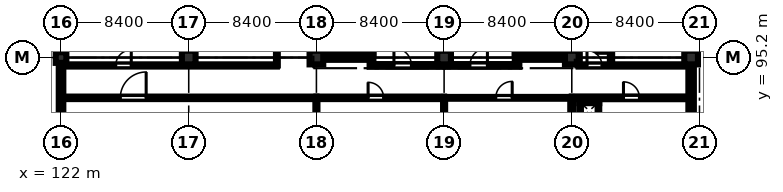
"""IFC4 building model, lengths in metres.
Left out: names, types, materials, properties, quantities, classifications, styles, units other than length and angle.
Written with IfcOpenShell. Run it as: python <this file> out.ifc"""

import sys

from ifc_helpers import new_model, si_unit, direction, frame, frame_2d, origin, origin_2d, place, context, subcontext, project, spatial, rectangle, extrude, element, fill, save


model = new_model("IFC4")
c1 = context("Model", 3, precision=1e-05, world=origin(), true_north=direction((0.0, 1.0)))
c2 = subcontext(c1, "Body", "Model", "MODEL_VIEW")
j1 = project(units=[si_unit("LENGTHUNIT", "METRE"), si_unit("PLANEANGLEUNIT", "RADIAN")], contexts=[c1])
p1 = place(None, origin())
s1 = spatial("IfcSite", under=j1, at=p1, CompositionType="ELEMENT")
p2 = place(p1, origin())
s2 = spatial("IfcBuilding", under=s1, at=p2, CompositionType="ELEMENT")
p3 = place(p2, frame((0.0, 0.0, 19.2)))
s3 = spatial("IfcBuildingStorey", under=s2, at=p3, CompositionType="ELEMENT", Elevation=19.2)
p4 = place(p3, frame((122.0, 95.2, 0.0), z_axis=(0.0, 0.0, 1.0), x_axis=(1.0, 0.0, 0.0)))
e1 = element("IfcColumn", 1, at=p4, inside=s3, PredefinedType="COLUMN", context=c2, shape_type="SweptSolid", body=[
    extrude(rectangle(XDim=0.7, YDim=0.7, at=origin_2d()), origin(), (0.0, 0.0, 1.0), 4.02),
])
for number, where, z_axis, x_axis in (
    (2, (130.4, 95.2, 0.0), (0.0, 0.0, 1.0), (1.0, 0.0, 0.0)),
    (3, (138.8, 95.2, 0.0), (0.0, 0.0, 1.0), (1.0, 0.0, 0.0)),
    (4, (147.2, 95.2, 0.0), (0.0, 0.0, 1.0), (1.0, 0.0, 0.0)),
    (5, (155.6, 95.2, 0.0), (0.0, 0.0, 1.0), (1.0, 0.0, 0.0)),
    (6, (163.45, 95.2, 0.0), (0.0, 0.0, 1.0), (1.0, 0.0, 0.0)),
):
    element("IfcColumn", number, at=place(p3, frame(where, z_axis=z_axis, x_axis=x_axis)), inside=s3, PredefinedType="COLUMN", context=c2, shape_type="SweptSolid", body=[
        extrude(rectangle(XDim=0.9, YDim=0.9, at=origin_2d()), origin(), (0.0, 0.0, 1.0), 4.02),
    ])
p5 = place(p3, frame((138.65, 95.25, 0.0), z_axis=(0.0, 0.0, 1.0), x_axis=(1.0, 0.0, 0.0)))
e7 = element("IfcWall", 7, at=p5, inside=s3, PredefinedType="SHEAR", context=c2, shape_type="SweptSolid", body=[
    extrude(rectangle(XDim=3.9, YDim=0.4, at=frame_2d((1.95, 0.0))), origin(), (0.0, 0.0, 1.0), 4.02),
])
p6 = place(p3, frame((138.85, 95.45, 0.0), z_axis=(0.0, 0.0, 1.0), x_axis=(0.0, 1.0, 0.0)))
e8 = element("IfcWall", 8, at=p6, inside=s3, PredefinedType="SHEAR", context=c2, shape_type="SweptSolid", body=[
    extrude(rectangle(XDim=7.9, YDim=0.4, at=frame_2d((3.95, 0.0))), origin(), (0.0, 0.0, 1.0), 4.02),
])
p7 = place(p3, frame((142.35, 95.45, 0.0), z_axis=(0.0, 0.0, 1.0), x_axis=(0.0, 1.0, 0.0)))
e9 = element("IfcWall", 9, at=p7, inside=s3, PredefinedType="SHEAR", context=c2, shape_type="SweptSolid", body=[
    extrude(rectangle(XDim=7.9, YDim=0.4, at=frame_2d((3.95, 0.0))), origin(), (0.0, 0.0, 1.0), 4.02),
])
p8 = place(p7, frame((0.22, 0.0, 0.0)))
e10 = element("IfcOpeningElement", 10, at=p8, cuts=e9, PredefinedType="OPENING", context=c2, shape_type="SweptSolid", body=[
    extrude(rectangle(XDim=1.15, YDim=2.15, at=frame_2d((0.575, 1.075))), frame((0.0, 0.21, 0.0), z_axis=(0.0, -1.0, 0.0), x_axis=(1.0, 0.0, 0.0)), (0.0, 0.0, 1.0), 0.42),
])
p9 = place(p3, frame((151.85, 95.25, 0.0), z_axis=(0.0, 0.0, 1.0), x_axis=(1.0, 0.0, 0.0)))
e11 = element("IfcWall", 11, at=p9, inside=s3, PredefinedType="SHEAR", context=c2, shape_type="SweptSolid", body=[
    extrude(rectangle(XDim=3.9, YDim=0.4, at=frame_2d((1.95, 0.0))), origin(), (0.0, 0.0, 1.0), 4.02),
])
p10 = place(p3, frame((152.05, 95.45, 0.0), z_axis=(0.0, 0.0, 1.0), x_axis=(0.0, 1.0, 0.0)))
e12 = element("IfcWall", 12, at=p10, inside=s3, PredefinedType="SHEAR", context=c2, shape_type="SweptSolid", body=[
    extrude(rectangle(XDim=7.9, YDim=0.4, at=frame_2d((3.95, 0.0))), origin(), (0.0, 0.0, 1.0), 4.02),
])
p11 = place(p10, frame((0.35, 0.0, 0.0)))
e13 = element("IfcOpeningElement", 13, at=p11, cuts=e12, PredefinedType="OPENING", context=c2, shape_type="SweptSolid", body=[
    extrude(rectangle(XDim=1.15, YDim=2.15, at=frame_2d((0.575, 1.075))), frame((0.0, 0.21, 0.0), z_axis=(0.0, -1.0, 0.0), x_axis=(1.0, 0.0, 0.0)), (0.0, 0.0, 1.0), 0.42),
])
p12 = place(p3, frame((155.55, 95.45, 0.0), z_axis=(0.0, 0.0, 1.0), x_axis=(0.0, 1.0, 0.0)))
e14 = element("IfcWall", 14, at=p12, inside=s3, PredefinedType="SHEAR", context=c2, shape_type="SweptSolid", body=[
    extrude(rectangle(XDim=7.9, YDim=0.4, at=frame_2d((3.95, 0.0))), origin(), (0.0, 0.0, 1.0), 4.02),
])
p13 = place(p3, frame((163.45, 94.75, 0.0), z_axis=(0.0, 0.0, 1.0), x_axis=(0.0, -1.0, 0.0)))
e15 = element("IfcWall", 15, at=p13, inside=s3, PredefinedType="STANDARD", context=c2, shape_type="SweptSolid", body=[
    extrude(rectangle(XDim=7.5, YDim=0.36, at=frame_2d((3.75, 0.0))), origin(), (0.0, 0.0, 1.0), 3.32),
])
p14 = place(p13, frame((4.2, 0.0, 1.1)))
e16 = element("IfcOpeningElement", 16, at=p14, cuts=e15, PredefinedType="OPENING", context=c2, shape_type="SweptSolid", body=[
    extrude(rectangle(XDim=1.8, YDim=1.8, at=frame_2d((0.9, 0.9))), frame((0.0, 0.19, 0.0), z_axis=(0.0, -1.0, 0.0), x_axis=(1.0, 0.0, 0.0)), (0.0, 0.0, 1.0), 0.38),
])
p15 = place(p3, frame((122.0, 87.15, 0.0), z_axis=(0.0, 0.0, 1.0), x_axis=(0.0, 1.0, 0.0)))
e17 = element("IfcWall", 17, at=p15, inside=s3, PredefinedType="STANDARD", context=c2, shape_type="SweptSolid", body=[
    extrude(rectangle(XDim=7.7, YDim=0.3, at=frame_2d((3.85, 0.0))), origin(), (0.0, 0.0, 1.0), 3.32),
])
p16 = place(p15, frame((2.4, 0.0, 0.95)))
e18 = element("IfcOpeningElement", 18, at=p16, cuts=e17, PredefinedType="OPENING", context=c2, shape_type="SweptSolid", body=[
    extrude(rectangle(XDim=1.5, YDim=1.8, at=frame_2d((0.75, 0.9))), frame((0.0, 0.16, 0.0), z_axis=(0.0, -1.0, 0.0), x_axis=(1.0, 0.0, 0.0)), (0.0, 0.0, 1.0), 0.32),
])
p17 = place(p3, frame((122.0, 95.55, 0.0), z_axis=(0.0, 0.0, 1.0), x_axis=(0.0, 1.0, 0.0)))
e19 = element("IfcWall", 19, at=p17, inside=s3, PredefinedType="STANDARD", context=c2, shape_type="SweptSolid", body=[
    extrude(rectangle(XDim=7.7, YDim=0.3, at=frame_2d((3.85, 0.0))), origin(), (0.0, 0.0, 1.0), 3.32),
])
p18 = place(p17, frame((2.4, 0.0, 1.0)))
e20 = element("IfcOpeningElement", 20, at=p18, cuts=e19, PredefinedType="OPENING", context=c2, shape_type="SweptSolid", body=[
    extrude(rectangle(XDim=1.8, YDim=1.8, at=frame_2d((0.9, 0.9))), frame((0.0, 0.16, 0.0), z_axis=(0.0, -1.0, 0.0), x_axis=(1.0, 0.0, 0.0)), (0.0, 0.0, 1.0), 0.32),
])
p19 = place(p3, frame((142.3, 94.68, 0.0), z_axis=(0.0, 0.0, 1.0), x_axis=(1.0, 0.0, 0.0)))
e21 = element("IfcWall", 21, at=p19, inside=s3, PredefinedType="STANDARD", context=c2, shape_type="SweptSolid", body=[
    extrude(rectangle(XDim=4.8, YDim=0.18, at=frame_2d((2.4, 0.0))), origin(), (0.0, 0.0, 1.0), 4.02),
])
p20 = place(p19, frame((1.6, 0.0, 0.0)))
e22 = element("IfcOpeningElement", 22, at=p20, cuts=e21, PredefinedType="OPENING", context=c2, shape_type="SweptSolid", body=[
    extrude(rectangle(XDim=1.15, YDim=2.15, at=frame_2d((0.575, 1.075))), frame((0.0, 0.1, 0.0), z_axis=(0.0, -1.0, 0.0), x_axis=(1.0, 0.0, 0.0)), (0.0, 0.0, 1.0), 0.2),
])
p21 = place(p3, frame((147.3, 94.68, 0.0), z_axis=(0.0, 0.0, 1.0), x_axis=(1.0, 0.0, 0.0)))
e23 = element("IfcWall", 23, at=p21, inside=s3, PredefinedType="STANDARD", context=c2, shape_type="SweptSolid", body=[
    extrude(rectangle(XDim=4.85, YDim=0.18, at=frame_2d((2.425, 0.0))), origin(), (0.0, 0.0, 1.0), 4.02),
])
p22 = place(p21, frame((1.6, 0.0, 0.0)))
e24 = element("IfcOpeningElement", 24, at=p22, cuts=e23, PredefinedType="OPENING", context=c2, shape_type="SweptSolid", body=[
    extrude(rectangle(XDim=1.15, YDim=2.15, at=frame_2d((0.575, 1.075))), frame((0.0, 0.1, 0.0), z_axis=(0.0, -1.0, 0.0), x_axis=(1.0, 0.0, 0.0)), (0.0, 0.0, 1.0), 0.2),
])
p23 = place(p3, frame((156.05, 94.68, 0.0), z_axis=(0.0, 0.0, 1.0), x_axis=(1.0, 0.0, 0.0)))
e25 = element("IfcWall", 25, at=p23, inside=s3, PredefinedType="PARTITIONING", context=c2, shape_type="SweptSolid", body=[
    extrude(rectangle(XDim=7.15, YDim=0.15, at=frame_2d((3.575, 0.0))), origin(), (0.0, 0.0, 1.0), 4.02),
])
p24 = place(p23, frame((0.55, 0.0, 0.0)))
e26 = element("IfcOpeningElement", 26, at=p24, cuts=e25, PredefinedType="OPENING", context=c2, shape_type="SweptSolid", body=[
    extrude(rectangle(XDim=0.98, YDim=2.12, at=frame_2d((0.49, 1.06))), frame((0.0, 0.085, 0.0), z_axis=(0.0, -1.0, 0.0), x_axis=(1.0, 0.0, 0.0)), (0.0, 0.0, 1.0), 0.17),
])
p25 = place(p3, frame((158.18, 94.68, 0.0), z_axis=(0.0, 0.0, 1.0), x_axis=(0.0, 1.0, 0.0)))
e27 = element("IfcWall", 27, at=p25, inside=s3, PredefinedType="PARTITIONING", context=c2, shape_type="SweptSolid", body=[
    extrude(rectangle(XDim=8.57, YDim=0.15, at=frame_2d((4.285, 0.0))), origin(), (0.0, 0.0, 1.0), 4.02),
])
p26 = place(p25, frame((0.8, 0.0, 0.0)))
e28 = element("IfcOpeningElement", 28, at=p26, cuts=e27, PredefinedType="OPENING", context=c2, shape_type="SweptSolid", body=[
    extrude(rectangle(XDim=1.0, YDim=2.12, at=frame_2d((0.5, 1.06))), frame((0.0, 0.085, 0.0), z_axis=(0.0, -1.0, 0.0), x_axis=(1.0, 0.0, 0.0)), (0.0, 0.0, 1.0), 0.17),
])
p27 = place(p25, frame((3.5, 0.0, 0.0)))
e29 = element("IfcOpeningElement", 29, at=p27, cuts=e27, PredefinedType="OPENING", context=c2, shape_type="SweptSolid", body=[
    extrude(rectangle(XDim=0.92, YDim=2.1, at=frame_2d((0.46, 1.05))), frame((0.0, 0.085, 0.0), z_axis=(0.0, -1.0, 0.0), x_axis=(1.0, 0.0, 0.0)), (0.0, 0.0, 1.0), 0.17),
])
p28 = place(p25, frame((6.4, 0.0, 0.0)))
e30 = element("IfcOpeningElement", 30, at=p28, cuts=e27, PredefinedType="OPENING", context=c2, shape_type="SweptSolid", body=[
    extrude(rectangle(XDim=0.92, YDim=2.1, at=frame_2d((0.46, 1.05))), frame((0.0, 0.085, 0.0), z_axis=(0.0, -1.0, 0.0), x_axis=(1.0, 0.0, 0.0)), (0.0, 0.0, 1.0), 0.17),
])
p29 = place(p3, frame((156.05, 94.68, 0.0), z_axis=(0.0, 0.0, 1.0), x_axis=(0.0, 1.0, 0.0)))
e31 = element("IfcWall", 31, at=p29, inside=s3, PredefinedType="PARTITIONING", context=c2, shape_type="SweptSolid", body=[
    extrude(rectangle(XDim=8.57, YDim=0.15, at=frame_2d((4.285, 0.0))), origin(), (0.0, 0.0, 1.0), 4.02),
])
p30 = place(p3, frame((136.2, 94.68, 0.0), z_axis=(0.0, 0.0, 1.0), x_axis=(0.0, 1.0, 0.0)))
e32 = element("IfcWall", 32, at=p30, inside=s3, PredefinedType="PARTITIONING", context=c2, shape_type="SweptSolid", body=[
    extrude(rectangle(XDim=9.07, YDim=0.12, at=frame_2d((4.535, 0.0))), origin(), (0.0, 0.0, 1.0), 4.02),
])
p31 = place(p3, frame((122.4, 94.68, 0.0), z_axis=(0.0, 0.0, 1.0), x_axis=(1.0, 0.0, 0.0)))
e33 = element("IfcWall", 33, at=p31, inside=s3, PredefinedType="PARTITIONING", context=c2, shape_type="SweptSolid", body=[
    extrude(rectangle(XDim=13.8, YDim=0.145, at=frame_2d((6.9, 0.0))), origin(), (0.0, 0.0, 1.0), 4.02),
])
p32 = place(p31, frame((3.2, 0.0, 0.0)))
e34 = element("IfcOpeningElement", 34, at=p32, cuts=e33, PredefinedType="OPENING", context=c2, shape_type="SweptSolid", body=[
    extrude(rectangle(XDim=1.02, YDim=2.15, at=frame_2d((0.51, 1.075))), frame((0.0, 0.083, 0.0), z_axis=(0.0, -1.0, 0.0), x_axis=(1.0, 0.0, 0.0)), (0.0, 0.0, 1.0), 0.165),
])
p33 = place(p3, frame((122.15, 92.55, 0.0), z_axis=(0.0, 0.0, 1.0), x_axis=(1.0, 0.0, 0.0)))
e35 = element("IfcWall", 35, at=p33, inside=s3, PredefinedType="PARTITIONING", context=c2, shape_type="SweptSolid", body=[
    extrude(rectangle(XDim=16.65, YDim=0.165, at=frame_2d((8.325, 0.0))), origin(), (0.0, 0.0, 1.0), 4.02),
])
p34 = place(p33, frame((3.75, 0.0, 0.0)))
e36 = element("IfcOpeningElement", 36, at=p34, cuts=e35, PredefinedType="OPENING", context=c2, shape_type="SweptSolid", body=[
    extrude(rectangle(XDim=1.7, YDim=2.2, at=frame_2d((0.85, 1.1))), frame((0.0, 0.093, 0.0), z_axis=(0.0, -1.0, 0.0), x_axis=(1.0, 0.0, 0.0)), (0.0, 0.0, 1.0), 0.185),
])
p35 = place(p3, frame((138.8, 92.55, 0.0), z_axis=(0.0, 0.0, 1.0), x_axis=(1.0, 0.0, 0.0)))
e37 = element("IfcWall", 37, at=p35, inside=s3, PredefinedType="PARTITIONING", context=c2, shape_type="SweptSolid", body=[
    extrude(rectangle(XDim=8.4, YDim=0.165, at=frame_2d((4.2, 0.0))), origin(), (0.0, 0.0, 1.0), 4.02),
])
p36 = place(p35, frame((3.4, 0.0, 0.0)))
e38 = element("IfcOpeningElement", 38, at=p36, cuts=e37, PredefinedType="OPENING", context=c2, shape_type="SweptSolid", body=[
    extrude(rectangle(XDim=1.02, YDim=2.15, at=frame_2d((0.51, 1.075))), frame((0.0, 0.093, 0.0), z_axis=(0.0, -1.0, 0.0), x_axis=(1.0, 0.0, 0.0)), (0.0, 0.0, 1.0), 0.185),
])
p37 = place(p3, frame((138.8, 78.55, 0.0), z_axis=(0.0, 0.0, 1.0), x_axis=(0.0, 1.0, 0.0)))
e39 = element("IfcWall", 39, at=p37, inside=s3, PredefinedType="PARTITIONING", context=c2, shape_type="SweptSolid", body=[
    extrude(rectangle(XDim=14.0, YDim=0.135, at=frame_2d((7.0, 0.0))), origin(), (0.0, 0.0, 1.0), 3.32),
])
p38 = place(p3, frame((147.2, 92.55, 0.0), z_axis=(0.0, 0.0, 1.0), x_axis=(1.0, 0.0, 0.0)))
e40 = element("IfcWall", 40, at=p38, inside=s3, PredefinedType="PARTITIONING", context=c2, shape_type="SweptSolid", body=[
    extrude(rectangle(XDim=8.4, YDim=0.12, at=frame_2d((4.2, 0.0))), origin(), (0.0, 0.0, 1.0), 4.02),
])
p39 = place(p38, frame((3.4, 0.0, 0.0)))
e41 = element("IfcOpeningElement", 41, at=p39, cuts=e40, PredefinedType="OPENING", context=c2, shape_type="SweptSolid", body=[
    extrude(rectangle(XDim=1.08, YDim=2.15, at=frame_2d((0.54, 1.075))), frame((0.0, 0.07, 0.0), z_axis=(0.0, -1.0, 0.0), x_axis=(1.0, 0.0, 0.0)), (0.0, 0.0, 1.0), 0.14),
])
p40 = place(p3, frame((147.2, 78.55, 0.0), z_axis=(0.0, 0.0, 1.0), x_axis=(0.0, 1.0, 0.0)))
e42 = element("IfcWall", 42, at=p40, inside=s3, PredefinedType="PARTITIONING", context=c2, shape_type="SweptSolid", body=[
    extrude(rectangle(XDim=14.0, YDim=0.135, at=frame_2d((7.0, 0.0))), origin(), (0.0, 0.0, 1.0), 3.32),
])
p41 = place(p3, frame((155.6, 92.55, 0.0), z_axis=(0.0, 0.0, 1.0), x_axis=(1.0, 0.0, 0.0)))
e43 = element("IfcWall", 43, at=p41, inside=s3, PredefinedType="STANDARD", context=c2, shape_type="SweptSolid", body=[
    extrude(rectangle(XDim=7.75, YDim=0.18, at=frame_2d((3.875, 0.0))), origin(), (0.0, 0.0, 1.0), 4.02),
])
p42 = place(p41, frame((3.4, 0.0, 0.0)))
e44 = element("IfcOpeningElement", 44, at=p42, cuts=e43, PredefinedType="OPENING", context=c2, shape_type="SweptSolid", body=[
    extrude(rectangle(XDim=1.05, YDim=2.15, at=frame_2d((0.525, 1.075))), frame((0.0, 0.1, 0.0), z_axis=(0.0, -1.0, 0.0), x_axis=(1.0, 0.0, 0.0)), (0.0, 0.0, 1.0), 0.2),
])
p43 = place(p3, frame((155.6, 78.55, 0.0), z_axis=(0.0, 0.0, 1.0), x_axis=(0.0, 1.0, 0.0)))
e45 = element("IfcWall", 45, at=p43, inside=s3, PredefinedType="SOLIDWALL", context=c2, shape_type="SweptSolid", body=[
    extrude(rectangle(XDim=14.0, YDim=0.2, at=frame_2d((7.0, 0.0))), origin(), (0.0, 0.0, 1.0), 3.32),
])
p44 = place(p3, frame((156.095, 92.252, 0.0), z_axis=(0.0, 0.0, 1.0), x_axis=(1.0, 0.0, 0.0)))
e46 = element("IfcWall", 46, at=p44, inside=s3, PredefinedType="PARTITIONING", context=c2, shape_type="SweptSolid", body=[
    extrude(rectangle(XDim=1.31, YDim=0.105, at=frame_2d((0.655, 0.0))), origin(), (0.0, 0.0, 1.0), 4.02),
])
for number, where, z_axis, x_axis in (
    (47, (156.147, 91.2, 0.0), (0.0, 0.0, 1.0), (0.0, 1.0, 0.0)),
    (48, (157.353, 91.2, 0.0), (0.0, 0.0, 1.0), (0.0, 1.0, 0.0)),
):
    element("IfcWall", number, at=place(p3, frame(where, z_axis=z_axis, x_axis=x_axis)), inside=s3, PredefinedType="PARTITIONING", context=c2, shape_type="SweptSolid", body=[
        extrude(rectangle(XDim=1.0, YDim=0.105, at=frame_2d((0.5, 0.0))), origin(), (0.0, 0.0, 1.0), 4.02),
    ])
p45 = place(p20, origin())
e49 = element("IfcDoor", 49, at=p45, inside=s3, OperationType="SINGLE_SWING_LEFT", PredefinedType="DOOR", context=c2, shape_type="SweptSolid", body=[
    extrude(rectangle(XDim=1.15, YDim=2.15, at=frame_2d((0.575, 1.075))), frame((0.0, 0.025, 0.0), z_axis=(0.0, -1.0, 0.0), x_axis=(1.0, 0.0, 0.0)), (0.0, 0.0, 1.0), 0.05),
])
fill(e22, e49)
p46 = place(p22, origin())
e50 = element("IfcDoor", 50, at=p46, inside=s3, OperationType="SINGLE_SWING_RIGHT", PredefinedType="DOOR", context=c2, shape_type="SweptSolid", body=[
    extrude(rectangle(XDim=1.15, YDim=2.15, at=frame_2d((0.575, 1.075))), frame((0.0, 0.025, 0.0), z_axis=(0.0, -1.0, 0.0), x_axis=(1.0, 0.0, 0.0)), (0.0, 0.0, 1.0), 0.05),
])
fill(e24, e50)
p47 = place(p24, origin())
e51 = element("IfcDoor", 51, at=p47, inside=s3, OperationType="SINGLE_SWING_LEFT", PredefinedType="DOOR", context=c2, shape_type="SweptSolid", body=[
    extrude(rectangle(XDim=0.98, YDim=2.12, at=frame_2d((0.49, 1.06))), frame((0.0, 0.025, 0.0), z_axis=(0.0, -1.0, 0.0), x_axis=(1.0, 0.0, 0.0)), (0.0, 0.0, 1.0), 0.05),
])
fill(e26, e51)
p48 = place(p26, origin())
e52 = element("IfcDoor", 52, at=p48, inside=s3, OperationType="SINGLE_SWING_LEFT", PredefinedType="DOOR", context=c2, shape_type="SweptSolid", body=[
    extrude(rectangle(XDim=1.0, YDim=2.12, at=frame_2d((0.5, 1.06))), frame((0.0, 0.025, 0.0), z_axis=(0.0, -1.0, 0.0), x_axis=(1.0, 0.0, 0.0)), (0.0, 0.0, 1.0), 0.05),
])
fill(e28, e52)
p49 = place(p32, origin())
e53 = element("IfcDoor", 53, at=p49, inside=s3, OperationType="SINGLE_SWING_RIGHT", PredefinedType="DOOR", context=c2, shape_type="SweptSolid", body=[
    extrude(rectangle(XDim=1.02, YDim=2.15, at=frame_2d((0.51, 1.075))), frame((0.0, 0.025, 0.0), z_axis=(0.0, -1.0, 0.0), x_axis=(1.0, 0.0, 0.0)), (0.0, 0.0, 1.0), 0.05),
])
fill(e34, e53)
p50 = place(p34, origin())
e54 = element("IfcDoor", 54, at=p50, inside=s3, OperationType="SINGLE_SWING_RIGHT", PredefinedType="DOOR", context=c2, shape_type="SweptSolid", body=[
    extrude(rectangle(XDim=1.7, YDim=2.2, at=frame_2d((0.85, 1.1))), frame((0.0, 0.025, 0.0), z_axis=(0.0, -1.0, 0.0), x_axis=(1.0, 0.0, 0.0)), (0.0, 0.0, 1.0), 0.05),
])
fill(e36, e54)
p51 = place(p36, origin())
e55 = element("IfcDoor", 55, at=p51, inside=s3, OperationType="SINGLE_SWING_LEFT", PredefinedType="DOOR", context=c2, shape_type="SweptSolid", body=[
    extrude(rectangle(XDim=1.02, YDim=2.15, at=frame_2d((0.51, 1.075))), frame((0.0, 0.025, 0.0), z_axis=(0.0, -1.0, 0.0), x_axis=(1.0, 0.0, 0.0)), (0.0, 0.0, 1.0), 0.05),
])
fill(e38, e55)
p52 = place(p39, origin())
e56 = element("IfcDoor", 56, at=p52, inside=s3, OperationType="SINGLE_SWING_RIGHT", PredefinedType="DOOR", context=c2, shape_type="SweptSolid", body=[
    extrude(rectangle(XDim=1.08, YDim=2.15, at=frame_2d((0.54, 1.075))), frame((0.0, 0.025, 0.0), z_axis=(0.0, -1.0, 0.0), x_axis=(1.0, 0.0, 0.0)), (0.0, 0.0, 1.0), 0.05),
])
fill(e41, e56)
p53 = place(p42, origin())
e57 = element("IfcDoor", 57, at=p53, inside=s3, OperationType="SINGLE_SWING_LEFT", PredefinedType="DOOR", context=c2, shape_type="SweptSolid", body=[
    extrude(rectangle(XDim=1.05, YDim=2.15, at=frame_2d((0.525, 1.075))), frame((0.0, 0.025, 0.0), z_axis=(0.0, -1.0, 0.0), x_axis=(1.0, 0.0, 0.0)), (0.0, 0.0, 1.0), 0.05),
])
fill(e44, e57)
save(model, sys.argv[1])
